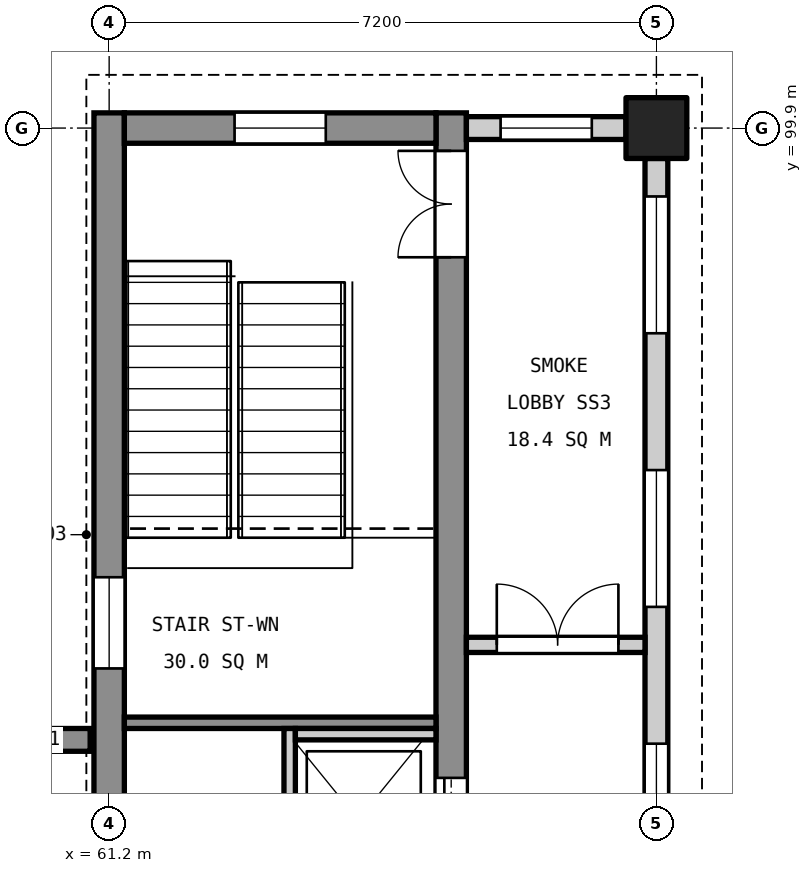
"""IFC4 building model, lengths in metres.
Left out: names, types, materials, properties, quantities, classifications, styles, units other than length and angle.
Written with IfcOpenShell. Run it as: python <this file> out.ifc"""

import sys

from ifc_helpers import new_model, si_unit, direction, frame, frame_2d, origin, origin_2d, place, context, subcontext, project, spatial, rectangle, extrude, element, fill, save


model = new_model("IFC4")
c1 = context("Model", 3, precision=1e-05, world=origin(), true_north=direction((0.0, 1.0)))
c2 = subcontext(c1, "Body", "Model", "MODEL_VIEW")
j1 = project(units=[si_unit("LENGTHUNIT", "METRE"), si_unit("PLANEANGLEUNIT", "RADIAN")], contexts=[c1])
p1 = place(None, origin())
s1 = spatial("IfcSite", under=j1, at=p1, CompositionType="ELEMENT")
p2 = place(p1, origin())
s2 = spatial("IfcBuilding", under=s1, at=p2, CompositionType="ELEMENT")
p3 = place(p2, frame((0.0, 0.0, 70.2)))
s3 = spatial("IfcBuildingStorey", under=s2, at=p3, CompositionType="ELEMENT", Elevation=70.2)
p4 = place(p3, frame((68.4, 99.9, 0.0), z_axis=(0.0, 0.0, 1.0), x_axis=(1.0, 0.0, 0.0)))
e1 = element("IfcColumn", 1, at=p4, inside=s3, PredefinedType="COLUMN", context=c2, shape_type="SweptSolid", body=[
    extrude(rectangle(XDim=0.8, YDim=0.8, at=origin_2d()), origin(), (0.0, 0.0, 1.0), 4.8),
])
p5 = place(p3, frame((61.2, 88.9, 0.0), z_axis=(0.0, 0.0, 1.0), x_axis=(0.0, 1.0, 0.0)))
e2 = element("IfcWall", 2, at=p5, inside=s3, PredefinedType="SHEAR", context=c2, shape_type="SweptSolid", body=[
    extrude(rectangle(XDim=11.2, YDim=0.4, at=frame_2d((5.6, 0.0))), origin(), (0.0, 0.0, 1.0), 4.55),
])
p6 = place(p5, frame((3.89, 0.0, 3.4)))
e3 = element("IfcOpeningElement", 3, at=p6, cuts=e2, PredefinedType="OPENING", context=c2, shape_type="SweptSolid", body=[
    extrude(rectangle(XDim=1.2, YDim=0.9, at=frame_2d((0.6, 0.45))), frame((0.0, 0.21, 0.0), z_axis=(0.0, -1.0, 0.0), x_axis=(1.0, 0.0, 0.0)), (0.0, 0.0, 1.0), 0.42),
])
p7 = place(p3, frame((65.7, 88.9, 0.0), z_axis=(0.0, 0.0, 1.0), x_axis=(0.0, 1.0, 0.0)))
e4 = element("IfcWall", 4, at=p7, inside=s3, PredefinedType="SHEAR", context=c2, shape_type="SweptSolid", body=[
    extrude(rectangle(XDim=11.2, YDim=0.4, at=frame_2d((5.6, 0.0))), origin(), (0.0, 0.0, 1.0), 4.55),
])
p8 = place(p7, frame((9.3, 0.0, 0.0)))
e5 = element("IfcOpeningElement", 5, at=p8, cuts=e4, PredefinedType="OPENING", context=c2, shape_type="SweptSolid", body=[
    extrude(rectangle(XDim=1.4, YDim=2.1, at=frame_2d((0.7, 1.05))), frame((0.0, 0.21, 0.0), z_axis=(0.0, -1.0, 0.0), x_axis=(1.0, 0.0, 0.0)), (0.0, 0.0, 1.0), 0.42),
])
p9 = place(p7, frame((1.35, 0.0, 0.0)))
e6 = element("IfcOpeningElement", 6, at=p9, cuts=e4, PredefinedType="OPENING", context=c2, shape_type="SweptSolid", body=[
    extrude(rectangle(XDim=1.1, YDim=2.1, at=frame_2d((0.55, 1.05))), frame((0.0, 0.21, 0.0), z_axis=(0.0, -1.0, 0.0), x_axis=(1.0, 0.0, 0.0)), (0.0, 0.0, 1.0), 0.42),
])
p10 = place(p3, frame((61.4, 99.9, 0.0), z_axis=(0.0, 0.0, 1.0), x_axis=(1.0, 0.0, 0.0)))
e7 = element("IfcWall", 7, at=p10, inside=s3, PredefinedType="SHEAR", context=c2, shape_type="SweptSolid", body=[
    extrude(rectangle(XDim=4.1, YDim=0.4, at=frame_2d((2.05, 0.0))), origin(), (0.0, 0.0, 1.0), 4.55),
])
p11 = place(p10, frame((1.45, 0.0, 3.4)))
e8 = element("IfcOpeningElement", 8, at=p11, cuts=e7, PredefinedType="OPENING", context=c2, shape_type="SweptSolid", body=[
    extrude(rectangle(XDim=1.2, YDim=0.9, at=frame_2d((0.6, 0.45))), frame((0.0, 0.21, 0.0), z_axis=(0.0, -1.0, 0.0), x_axis=(1.0, 0.0, 0.0)), (0.0, 0.0, 1.0), 0.42),
])
p12 = place(p3, frame((60.95, 91.85, 0.0), z_axis=(0.0, 0.0, 1.0), x_axis=(-1.0, 0.0, 0.0)))
e9 = element("IfcWall", 9, at=p12, inside=s3, PredefinedType="SHEAR", context=c2, shape_type="SweptSolid", body=[
    extrude(rectangle(XDim=1.25, YDim=0.3, at=frame_2d((0.625, 0.0))), origin(), (0.0, 0.0, 1.0), 4.8),
])
p13 = place(p3, frame((61.4, 92.075, 0.0), z_axis=(0.0, 0.0, 1.0), x_axis=(1.0, 0.0, 0.0)))
e10 = element("IfcWall", 10, at=p13, inside=s3, PredefinedType="SOLIDWALL", context=c2, shape_type="SweptSolid", body=[
    extrude(rectangle(XDim=4.1, YDim=0.15, at=frame_2d((2.05, 0.0))), origin(), (0.0, 0.0, 1.0), 4.55),
])
p14 = place(p3, frame((63.575, 92.0, 0.0), z_axis=(0.0, 0.0, 1.0), x_axis=(0.0, -1.0, 0.0)))
e11 = element("IfcWall", 11, at=p14, inside=s3, PredefinedType="SOLIDWALL", context=c2, shape_type="SweptSolid", body=[
    extrude(rectangle(XDim=2.7, YDim=0.15, at=frame_2d((1.35, 0.0))), origin(), (0.0, 0.0, 1.0), 4.55),
])
p15 = place(p3, frame((63.65, 91.925, 0.0), z_axis=(0.0, 0.0, 1.0), x_axis=(1.0, 0.0, 0.0)))
e12 = element("IfcWall", 12, at=p15, inside=s3, PredefinedType="SOLIDWALL", context=c2, shape_type="SweptSolid", body=[
    extrude(rectangle(XDim=1.85, YDim=0.15, at=frame_2d((0.925, 0.0))), origin(), (0.0, 0.0, 1.0), 4.55),
])
p16 = place(p3, frame((65.9, 99.9, 0.0), z_axis=(0.0, 0.0, 1.0), x_axis=(1.0, 0.0, 0.0)))
e13 = element("IfcWall", 13, at=p16, inside=s3, PredefinedType="STANDARD", context=c2, shape_type="SweptSolid", body=[
    extrude(rectangle(XDim=2.1, YDim=0.3, at=frame_2d((1.05, 0.0))), origin(), (0.0, 0.0, 1.0), 3.85),
])
p17 = place(p16, frame((0.45, 0.0, 0.9)))
e14 = element("IfcOpeningElement", 14, at=p17, cuts=e13, PredefinedType="OPENING", context=c2, shape_type="SweptSolid", body=[
    extrude(rectangle(XDim=1.2, YDim=2.4, at=frame_2d((0.6, 1.2))), frame((0.0, 0.16, 0.0), z_axis=(0.0, -1.0, 0.0), x_axis=(1.0, 0.0, 0.0)), (0.0, 0.0, 1.0), 0.32),
])
p18 = place(p3, frame((68.4, 89.5, 0.0), z_axis=(0.0, 0.0, 1.0), x_axis=(0.0, 1.0, 0.0)))
e15 = element("IfcWall", 15, at=p18, inside=s3, PredefinedType="STANDARD", context=c2, shape_type="SweptSolid", body=[
    extrude(rectangle(XDim=10.0, YDim=0.3, at=frame_2d((5.0, 0.0))), origin(), (0.0, 0.0, 1.0), 3.55),
])
p19 = place(p18, frame((0.5, 0.0, 0.9)))
e16 = element("IfcOpeningElement", 16, at=p19, cuts=e15, PredefinedType="OPENING", context=c2, shape_type="SweptSolid", body=[
    extrude(rectangle(XDim=1.8, YDim=2.4, at=frame_2d((0.9, 1.2))), frame((0.0, 0.16, 0.0), z_axis=(0.0, -1.0, 0.0), x_axis=(1.0, 0.0, 0.0)), (0.0, 0.0, 1.0), 0.32),
])
p20 = place(p18, frame((4.1, 0.0, 0.9)))
e17 = element("IfcOpeningElement", 17, at=p20, cuts=e15, PredefinedType="OPENING", context=c2, shape_type="SweptSolid", body=[
    extrude(rectangle(XDim=1.8, YDim=2.4, at=frame_2d((0.9, 1.2))), frame((0.0, 0.16, 0.0), z_axis=(0.0, -1.0, 0.0), x_axis=(1.0, 0.0, 0.0)), (0.0, 0.0, 1.0), 0.32),
])
p21 = place(p18, frame((7.7, 0.0, 0.9)))
e18 = element("IfcOpeningElement", 18, at=p21, cuts=e15, PredefinedType="OPENING", context=c2, shape_type="SweptSolid", body=[
    extrude(rectangle(XDim=1.8, YDim=2.4, at=frame_2d((0.9, 1.2))), frame((0.0, 0.16, 0.0), z_axis=(0.0, -1.0, 0.0), x_axis=(1.0, 0.0, 0.0)), (0.0, 0.0, 1.0), 0.32),
])
p22 = place(p3, frame((65.9, 93.1, 0.0), z_axis=(0.0, 0.0, 1.0), x_axis=(1.0, 0.0, 0.0)))
e19 = element("IfcWall", 19, at=p22, inside=s3, PredefinedType="PARTITIONING", context=c2, shape_type="SweptSolid", body=[
    extrude(rectangle(XDim=2.35, YDim=0.2, at=frame_2d((1.175, 0.0))), origin(), (0.0, 0.0, 1.0), 3.55),
])
p23 = place(p22, frame((0.4, 0.0, 0.0)))
e20 = element("IfcOpeningElement", 20, at=p23, cuts=e19, PredefinedType="OPENING", context=c2, shape_type="SweptSolid", body=[
    extrude(rectangle(XDim=1.6, YDim=2.1, at=frame_2d((0.8, 1.05))), frame((0.0, 0.11, 0.0), z_axis=(0.0, -1.0, 0.0), x_axis=(1.0, 0.0, 0.0)), (0.0, 0.0, 1.0), 0.22),
])
p24 = place(p8, origin())
e21 = element("IfcDoor", 21, at=p24, inside=s3, OperationType="DOUBLE_DOOR_SINGLE_SWING", PredefinedType="DOOR", context=c2, shape_type="SweptSolid", body=[
    extrude(rectangle(XDim=1.4, YDim=2.1, at=frame_2d((0.7, 1.05))), frame((0.0, 0.025, 0.0), z_axis=(0.0, -1.0, 0.0), x_axis=(1.0, 0.0, 0.0)), (0.0, 0.0, 1.0), 0.05),
])
fill(e5, e21)
p25 = place(p9, origin())
e22 = element("IfcDoor", 22, at=p25, inside=s3, OperationType="SLIDING_TO_LEFT", PredefinedType="DOOR", context=c2, shape_type="SweptSolid", body=[
    extrude(rectangle(XDim=1.1, YDim=2.1, at=frame_2d((0.55, 1.05))), frame((0.0, 0.025, 0.0), z_axis=(0.0, -1.0, 0.0), x_axis=(1.0, 0.0, 0.0)), (0.0, 0.0, 1.0), 0.05),
])
fill(e6, e22)
p26 = place(p17, origin())
e23 = element("IfcWindow", 23, at=p26, inside=s3, PartitioningType="SINGLE_PANEL", PredefinedType="WINDOW", context=c2, shape_type="SweptSolid", body=[
    extrude(rectangle(XDim=1.2, YDim=2.4, at=frame_2d((0.6, 1.2))), frame((0.0, 0.03, 0.0), z_axis=(0.0, -1.0, 0.0), x_axis=(1.0, 0.0, 0.0)), (0.0, 0.0, 1.0), 0.06),
])
fill(e14, e23)
p27 = place(p19, origin())
e24 = element("IfcWindow", 24, at=p27, inside=s3, PartitioningType="SINGLE_PANEL", PredefinedType="WINDOW", context=c2, shape_type="SweptSolid", body=[
    extrude(rectangle(XDim=1.8, YDim=2.4, at=frame_2d((0.9, 1.2))), frame((0.0, 0.03, 0.0), z_axis=(0.0, -1.0, 0.0), x_axis=(1.0, 0.0, 0.0)), (0.0, 0.0, 1.0), 0.06),
])
fill(e16, e24)
p28 = place(p20, origin())
e25 = element("IfcWindow", 25, at=p28, inside=s3, PartitioningType="SINGLE_PANEL", PredefinedType="WINDOW", context=c2, shape_type="SweptSolid", body=[
    extrude(rectangle(XDim=1.8, YDim=2.4, at=frame_2d((0.9, 1.2))), frame((0.0, 0.03, 0.0), z_axis=(0.0, -1.0, 0.0), x_axis=(1.0, 0.0, 0.0)), (0.0, 0.0, 1.0), 0.06),
])
fill(e17, e25)
p29 = place(p21, origin())
e26 = element("IfcWindow", 26, at=p29, inside=s3, PartitioningType="SINGLE_PANEL", PredefinedType="WINDOW", context=c2, shape_type="SweptSolid", body=[
    extrude(rectangle(XDim=1.8, YDim=2.4, at=frame_2d((0.9, 1.2))), frame((0.0, 0.03, 0.0), z_axis=(0.0, -1.0, 0.0), x_axis=(1.0, 0.0, 0.0)), (0.0, 0.0, 1.0), 0.06),
])
fill(e18, e26)
p30 = place(p6, origin())
e27 = element("IfcWindow", 27, at=p30, inside=s3, PartitioningType="SINGLE_PANEL", PredefinedType="WINDOW", context=c2, shape_type="SweptSolid", body=[
    extrude(rectangle(XDim=1.2, YDim=0.9, at=frame_2d((0.6, 0.45))), frame((0.0, 0.03, 0.0), z_axis=(0.0, -1.0, 0.0), x_axis=(1.0, 0.0, 0.0)), (0.0, 0.0, 1.0), 0.06),
])
fill(e3, e27)
p31 = place(p11, origin())
e28 = element("IfcWindow", 28, at=p31, inside=s3, PartitioningType="SINGLE_PANEL", PredefinedType="WINDOW", context=c2, shape_type="SweptSolid", body=[
    extrude(rectangle(XDim=1.2, YDim=0.9, at=frame_2d((0.6, 0.45))), frame((0.0, 0.03, 0.0), z_axis=(0.0, -1.0, 0.0), x_axis=(1.0, 0.0, 0.0)), (0.0, 0.0, 1.0), 0.06),
])
fill(e8, e28)
p32 = place(p23, origin())
e29 = element("IfcDoor", 29, at=p32, inside=s3, OperationType="DOUBLE_DOOR_SINGLE_SWING", PredefinedType="DOOR", context=c2, shape_type="SweptSolid", body=[
    extrude(rectangle(XDim=1.6, YDim=2.1, at=frame_2d((0.8, 1.05))), frame((0.0, 0.025, 0.0), z_axis=(0.0, -1.0, 0.0), x_axis=(1.0, 0.0, 0.0)), (0.0, 0.0, 1.0), 0.05),
])
fill(e20, e29)
save(model, sys.argv[1])
